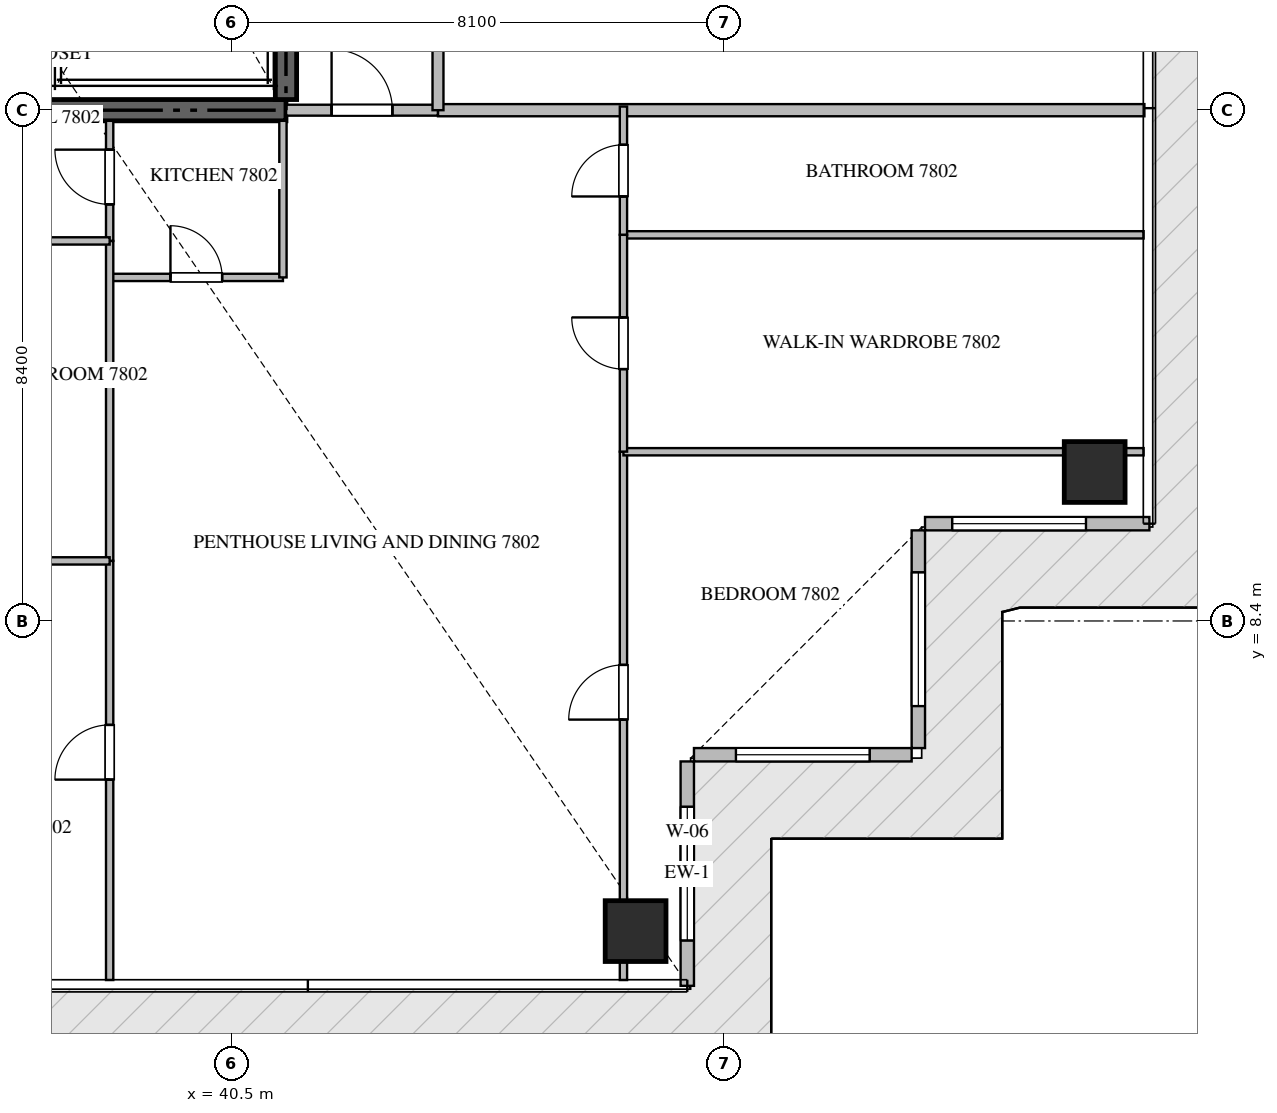
"""IFC4 building model, lengths in metres.
Left out: names, types, materials, properties, quantities, classifications, styles, units other than length and angle.
Written with IfcOpenShell. Run it as: python <this file> out.ifc"""

import sys

from ifc_helpers import new_model, si_unit, direction, frame, frame_2d, origin, origin_2d, place, context, subcontext, project, spatial, rectangle, extrude, source, transform, mapped, element, fill, save


model = new_model("IFC4")
c1 = context("Model", 3, precision=1e-05, world=origin(), true_north=direction((0.0, 1.0)))
c2 = subcontext(c1, "Body", "Model", "MODEL_VIEW")
j1 = project(units=[si_unit("LENGTHUNIT", "METRE"), si_unit("PLANEANGLEUNIT", "RADIAN")], contexts=[c1])
p1 = place(None, origin())
s1 = spatial("IfcSite", under=j1, at=p1, CompositionType="ELEMENT")
p2 = place(p1, origin())
s2 = spatial("IfcBuilding", under=s1, at=p2, CompositionType="ELEMENT")
p3 = place(p2, frame((0.0, 0.0, 313.7)))
s3 = spatial("IfcBuildingStorey", under=s2, at=p3, CompositionType="ELEMENT", Elevation=313.7)
p4 = place(p3, frame((23.4, 16.8, -0.26), z_axis=(0.0, 0.0, 1.0), x_axis=(1.0, 0.0, 0.0)))
e1 = element("IfcWall", 1, at=p4, inside=s3, PredefinedType="SHEAR", context=c2, shape_type="SweptSolid", body=[
    extrude(rectangle(XDim=18.0, YDim=0.35, at=frame_2d((9.0, 0.0))), origin(), (0.0, 0.0, 1.0), 4.048),
])
p5 = place(p3, frame((41.4, 16.975, -0.26), z_axis=(0.0, 0.0, 1.0), x_axis=(0.0, 1.0, 0.0)))
e2 = element("IfcWall", 2, at=p5, inside=s3, PredefinedType="SHEAR", context=c2, shape_type="SweptSolid", body=[
    extrude(rectangle(XDim=8.375, YDim=0.35, at=frame_2d((4.188, 0.0))), origin(), (0.0, 0.0, 1.0), 4.048),
])
m1 = source(origin(), c2, "Body", "SweptSolid", [
    extrude(rectangle(XDim=1.0, YDim=1.0, at=origin_2d()), origin(), (0.0, 0.0, 1.0), 4.05),
])
for number, where, z_axis, x_axis in (
    (3, (47.15, 3.3, -0.26), (0.0, 0.0, 1.0), (1.0, 0.0, 0.0)),
    (4, (54.7, 10.85, -0.26), (0.0, 0.0, 1.0), (1.0, 0.0, 0.0)),
):
    element("IfcColumn", number, at=place(p3, frame(where, z_axis=z_axis, x_axis=x_axis)), inside=s3, PredefinedType="COLUMN", context=c2, shape_type="MappedRepresentation", body=[
        mapped(m1, transform((0.0, 0.0, 0.0), scale=1.0)),
    ])
p6 = place(p3, frame((48.0, 2.4, 0.0), z_axis=(0.0, 0.0, 1.0), x_axis=(0.0, 1.0, 0.0)))
e5 = element("IfcWall", 5, at=p6, inside=s3, PredefinedType="ELEMENTEDWALL", context=c2, shape_type="SweptSolid", body=[
    extrude(rectangle(XDim=3.69, YDim=0.22, at=frame_2d((1.845, 0.0))), origin(), (0.0, 0.0, 1.0), 3.775),
])
p7 = place(p6, frame((0.745, 0.0, 0.65)))
e6 = element("IfcOpeningElement", 6, at=p7, cuts=e5, PredefinedType="OPENING", context=c2, shape_type="SweptSolid", body=[
    extrude(rectangle(XDim=2.2, YDim=2.4, at=frame_2d((1.1, 1.2))), frame((0.0, 0.12, 0.0), z_axis=(0.0, -1.0, 0.0), x_axis=(1.0, 0.0, 0.0)), (0.0, 0.0, 1.0), 0.24),
])
p8 = place(p3, frame((48.11, 6.2, 0.0), z_axis=(0.0, 0.0, 1.0), x_axis=(1.0, 0.0, 0.0)))
e7 = element("IfcWall", 7, at=p8, inside=s3, PredefinedType="ELEMENTEDWALL", context=c2, shape_type="SweptSolid", body=[
    extrude(rectangle(XDim=3.58, YDim=0.22, at=frame_2d((1.79, 0.0))), origin(), (0.0, 0.0, 1.0), 3.775),
])
p9 = place(p8, frame((0.69, 0.0, 0.65)))
e8 = element("IfcOpeningElement", 8, at=p9, cuts=e7, PredefinedType="OPENING", context=c2, shape_type="SweptSolid", body=[
    extrude(rectangle(XDim=2.2, YDim=2.4, at=frame_2d((1.1, 1.2))), frame((0.0, 0.12, 0.0), z_axis=(0.0, -1.0, 0.0), x_axis=(1.0, 0.0, 0.0)), (0.0, 0.0, 1.0), 0.24),
])
p10 = place(p3, frame((51.8, 6.31, 0.0), z_axis=(0.0, 0.0, 1.0), x_axis=(0.0, 1.0, 0.0)))
e9 = element("IfcWall", 9, at=p10, inside=s3, PredefinedType="ELEMENTEDWALL", context=c2, shape_type="SweptSolid", body=[
    extrude(rectangle(XDim=3.58, YDim=0.22, at=frame_2d((1.79, 0.0))), origin(), (0.0, 0.0, 1.0), 3.775),
])
p11 = place(p10, frame((0.69, 0.0, 0.65)))
e10 = element("IfcOpeningElement", 10, at=p11, cuts=e9, PredefinedType="OPENING", context=c2, shape_type="SweptSolid", body=[
    extrude(rectangle(XDim=2.2, YDim=2.4, at=frame_2d((1.1, 1.2))), frame((0.0, 0.12, 0.0), z_axis=(0.0, -1.0, 0.0), x_axis=(1.0, 0.0, 0.0)), (0.0, 0.0, 1.0), 0.24),
])
p12 = place(p3, frame((51.91, 10.0, 0.0), z_axis=(0.0, 0.0, 1.0), x_axis=(1.0, 0.0, 0.0)))
e11 = element("IfcWall", 11, at=p12, inside=s3, PredefinedType="ELEMENTEDWALL", context=c2, shape_type="SweptSolid", body=[
    extrude(rectangle(XDim=3.69, YDim=0.22, at=frame_2d((1.845, 0.0))), origin(), (0.0, 0.0, 1.0), 3.775),
])
p13 = place(p12, frame((0.447, 0.0, 0.65)))
e12 = element("IfcOpeningElement", 12, at=p13, cuts=e11, PredefinedType="OPENING", context=c2, shape_type="SweptSolid", body=[
    extrude(rectangle(XDim=2.2, YDim=2.4, at=frame_2d((1.1, 1.2))), frame((0.0, 0.12, 0.0), z_axis=(0.0, -1.0, 0.0), x_axis=(1.0, 0.0, 0.0)), (0.0, 0.0, 1.0), 0.24),
])
p14 = place(p3, frame((43.9, 16.8, 0.0), z_axis=(0.0, 0.0, 1.0), x_axis=(1.0, 0.0, 0.0)))
e13 = element("IfcWall", 13, at=p14, inside=s3, PredefinedType="PARTITIONING", context=c2, shape_type="SweptSolid", body=[
    extrude(rectangle(XDim=11.618, YDim=0.2, at=frame_2d((5.809, 0.0))), origin(), (0.0, 0.0, 1.0), 3.79),
])
p15 = place(p3, frame((41.402, 16.8, 0.0), z_axis=(0.0, 0.0, 1.0), x_axis=(1.0, 0.0, 0.0)))
e14 = element("IfcWall", 14, at=p15, inside=s3, PredefinedType="PARTITIONING", context=c2, shape_type="SweptSolid", body=[
    extrude(rectangle(XDim=2.496, YDim=0.18, at=frame_2d((1.248, 0.0))), origin(), (0.0, 0.0, 1.0), 3.79),
])
p16 = place(p15, frame((0.748, 0.0, 0.0)))
e15 = element("IfcOpeningElement", 15, at=p16, cuts=e14, PredefinedType="OPENING", context=c2, shape_type="SweptSolid", body=[
    extrude(rectangle(XDim=1.0, YDim=2.15, at=frame_2d((0.5, 1.075))), frame((0.0, 0.1, 0.0), z_axis=(0.0, -1.0, 0.0), x_axis=(1.0, 0.0, 0.0)), (0.0, 0.0, 1.0), 0.2),
])
p17 = place(p3, frame((43.9, 16.8, 0.0), z_axis=(0.0, 0.0, 1.0), x_axis=(0.0, 1.0, 0.0)))
e16 = element("IfcWall", 16, at=p17, inside=s3, PredefinedType="PARTITIONING", context=c2, shape_type="SweptSolid", body=[
    extrude(rectangle(XDim=16.8, YDim=0.18, at=frame_2d((8.4, 0.0))), origin(), (0.0, 0.0, 1.0), 3.79),
])
p18 = place(p17, frame((2.67, 0.0, 0.0)))
e17 = element("IfcOpeningElement", 17, at=p18, cuts=e16, PredefinedType="OPENING", context=c2, shape_type="SweptSolid", body=[
    extrude(rectangle(XDim=1.0, YDim=2.15, at=frame_2d((0.5, 1.075))), frame((0.0, 0.1, 0.0), z_axis=(0.0, -1.0, 0.0), x_axis=(1.0, 0.0, 0.0)), (0.0, 0.0, 1.0), 0.2),
])
p19 = place(p17, frame((11.107, 0.0, 0.0)))
e18 = element("IfcOpeningElement", 18, at=p19, cuts=e16, PredefinedType="OPENING", context=c2, shape_type="SweptSolid", body=[
    extrude(rectangle(XDim=1.0, YDim=2.15, at=frame_2d((0.5, 1.075))), frame((0.0, 0.1, 0.0), z_axis=(0.0, -1.0, 0.0), x_axis=(1.0, 0.0, 0.0)), (0.0, 0.0, 1.0), 0.2),
])
p20 = place(p3, frame((38.5, 14.05, 0.0), z_axis=(0.0, 0.0, 1.0), x_axis=(1.0, 0.0, 0.0)))
e19 = element("IfcWall", 19, at=p20, inside=s3, PredefinedType="PARTITIONING", context=c2, shape_type="SweptSolid", body=[
    extrude(rectangle(XDim=2.85, YDim=0.12, at=frame_2d((1.425, 0.0))), origin(), (0.0, 0.0, 1.0), 3.79),
])
p21 = place(p20, frame((1.0, 0.0, 0.0)))
e20 = element("IfcOpeningElement", 20, at=p21, cuts=e19, PredefinedType="OPENING", context=c2, shape_type="SweptSolid", body=[
    extrude(rectangle(XDim=0.85, YDim=2.1, at=frame_2d((0.425, 1.05))), frame((0.0, 0.07, 0.0), z_axis=(0.0, -1.0, 0.0), x_axis=(1.0, 0.0, 0.0)), (0.0, 0.0, 1.0), 0.14),
])
p22 = place(p3, frame((41.35, 14.05, 0.0), z_axis=(0.0, 0.0, 1.0), x_axis=(0.0, 1.0, 0.0)))
e21 = element("IfcWall", 21, at=p22, inside=s3, PredefinedType="PARTITIONING", context=c2, shape_type="SweptSolid", body=[
    extrude(rectangle(XDim=2.575, YDim=0.12, at=frame_2d((1.288, 0.0))), origin(), (0.0, 0.0, 1.0), 3.79),
])
p23 = place(p3, frame((38.5, 14.65, 0.0), z_axis=(0.0, 0.0, 1.0), x_axis=(0.0, 1.0, 0.0)))
e22 = element("IfcWall", 22, at=p23, inside=s3, PredefinedType="PARTITIONING", context=c2, shape_type="SweptSolid", body=[
    extrude(rectangle(XDim=1.975, YDim=0.12, at=frame_2d((0.988, 0.0))), origin(), (0.0, 0.0, 1.0), 3.79),
])
p24 = place(p23, frame((0.601, 0.0, 0.0)))
e23 = element("IfcOpeningElement", 23, at=p24, cuts=e22, PredefinedType="OPENING", context=c2, shape_type="SweptSolid", body=[
    extrude(rectangle(XDim=0.9, YDim=2.1, at=frame_2d((0.45, 1.05))), frame((0.0, 0.07, 0.0), z_axis=(0.0, -1.0, 0.0), x_axis=(1.0, 0.0, 0.0)), (0.0, 0.0, 1.0), 0.14),
])
p25 = place(p3, frame((38.5, 2.495, 0.0), z_axis=(0.0, 0.0, 1.0), x_axis=(0.0, 1.0, 0.0)))
e24 = element("IfcWall", 24, at=p25, inside=s3, PredefinedType="PARTITIONING", context=c2, shape_type="SweptSolid", body=[
    extrude(rectangle(XDim=6.893, YDim=0.12, at=frame_2d((3.446, 0.0))), origin(), (0.0, 0.0, 1.0), 3.79),
])
p26 = place(p25, frame((3.296, 0.0, 0.0)))
e25 = element("IfcOpeningElement", 25, at=p26, cuts=e24, PredefinedType="OPENING", context=c2, shape_type="SweptSolid", body=[
    extrude(rectangle(XDim=0.9, YDim=2.1, at=frame_2d((0.45, 1.05))), frame((0.0, 0.07, 0.0), z_axis=(0.0, -1.0, 0.0), x_axis=(1.0, 0.0, 0.0)), (0.0, 0.0, 1.0), 0.14),
])
p27 = place(p3, frame((38.5, 9.39, 0.0), z_axis=(0.0, 0.0, 1.0), x_axis=(0.0, 1.0, 0.0)))
e26 = element("IfcWall", 26, at=p27, inside=s3, PredefinedType="PARTITIONING", context=c2, shape_type="SweptSolid", body=[
    extrude(rectangle(XDim=5.258, YDim=0.12, at=frame_2d((2.629, 0.0))), origin(), (0.0, 0.0, 1.0), 3.79),
])
p28 = place(p3, frame((33.38, 9.388, 0.0), z_axis=(0.0, 0.0, 1.0), x_axis=(1.0, 0.0, 0.0)))
e27 = element("IfcWall", 27, at=p28, inside=s3, PredefinedType="PARTITIONING", context=c2, shape_type="SweptSolid", body=[
    extrude(rectangle(XDim=5.12, YDim=0.12, at=frame_2d((2.56, 0.0))), origin(), (0.0, 0.0, 1.0), 3.79),
])
p29 = place(p3, frame((35.482, 14.65, 0.0), z_axis=(0.0, 0.0, 1.0), x_axis=(1.0, 0.0, 0.0)))
e28 = element("IfcWall", 28, at=p29, inside=s3, PredefinedType="PARTITIONING", context=c2, shape_type="SweptSolid", body=[
    extrude(rectangle(XDim=3.018, YDim=0.12, at=frame_2d((1.509, 0.0))), origin(), (0.0, 0.0, 1.0), 3.79),
])
p30 = place(p29, frame((1.084, 0.0, 0.0)))
e29 = element("IfcOpeningElement", 29, at=p30, cuts=e28, PredefinedType="OPENING", context=c2, shape_type="SweptSolid", body=[
    extrude(rectangle(XDim=0.85, YDim=2.1, at=frame_2d((0.425, 1.05))), frame((0.0, 0.07, 0.0), z_axis=(0.0, -1.0, 0.0), x_axis=(1.0, 0.0, 0.0)), (0.0, 0.0, 1.0), 0.14),
])
p31 = place(p3, frame((46.95, 2.495, 0.0), z_axis=(0.0, 0.0, 1.0), x_axis=(0.0, 1.0, 0.0)))
e30 = element("IfcWall", 30, at=p31, inside=s3, PredefinedType="PARTITIONING", context=c2, shape_type="SweptSolid", body=[
    extrude(rectangle(XDim=8.688, YDim=0.12, at=frame_2d((4.344, 0.0))), origin(), (0.0, 0.0, 1.0), 3.292),
])
p32 = place(p31, frame((4.283, 0.0, 0.0)))
e31 = element("IfcOpeningElement", 31, at=p32, cuts=e30, PredefinedType="OPENING", context=c2, shape_type="SweptSolid", body=[
    extrude(rectangle(XDim=0.9, YDim=2.1, at=frame_2d((0.45, 1.05))), frame((0.0, 0.07, 0.0), z_axis=(0.0, -1.0, 0.0), x_axis=(1.0, 0.0, 0.0)), (0.0, 0.0, 1.0), 0.14),
])
for number, where, z_axis, x_axis in (
    (32, (46.95, 11.183, 0.0), (0.0, 0.0, 1.0), (1.0, 0.0, 0.0)),
    (33, (46.95, 14.75, 0.0), (0.0, 0.0, 1.0), (1.0, 0.0, 0.0)),
):
    element("IfcWall", number, at=place(p3, frame(where, z_axis=z_axis, x_axis=x_axis)), inside=s3, PredefinedType="PARTITIONING", context=c2, shape_type="SweptSolid", body=[
        extrude(rectangle(XDim=8.555, YDim=0.12, at=frame_2d((4.277, 0.0))), origin(), (0.0, 0.0, 1.0), 3.79),
    ])
p33 = place(p3, frame((46.95, 11.185, 0.0), z_axis=(0.0, 0.0, 1.0), x_axis=(0.0, 1.0, 0.0)))
e34 = element("IfcWall", 34, at=p33, inside=s3, PredefinedType="PARTITIONING", context=c2, shape_type="SweptSolid", body=[
    extrude(rectangle(XDim=3.565, YDim=0.12, at=frame_2d((1.782, 0.0))), origin(), (0.0, 0.0, 1.0), 3.372),
])
p34 = place(p33, frame((1.357, 0.0, 0.0)))
e35 = element("IfcOpeningElement", 35, at=p34, cuts=e34, PredefinedType="OPENING", context=c2, shape_type="SweptSolid", body=[
    extrude(rectangle(XDim=0.85, YDim=2.1, at=frame_2d((0.425, 1.05))), frame((0.0, 0.07, 0.0), z_axis=(0.0, -1.0, 0.0), x_axis=(1.0, 0.0, 0.0)), (0.0, 0.0, 1.0), 0.14),
])
p35 = place(p3, frame((46.95, 14.752, 0.0), z_axis=(0.0, 0.0, 1.0), x_axis=(0.0, 1.0, 0.0)))
e36 = element("IfcWall", 36, at=p35, inside=s3, PredefinedType="PARTITIONING", context=c2, shape_type="SweptSolid", body=[
    extrude(rectangle(XDim=2.108, YDim=0.12, at=frame_2d((1.054, 0.0))), origin(), (0.0, 0.0, 1.0), 3.372),
])
p36 = place(p35, frame((0.629, 0.0, 0.0)))
e37 = element("IfcOpeningElement", 37, at=p36, cuts=e36, PredefinedType="OPENING", context=c2, shape_type="SweptSolid", body=[
    extrude(rectangle(XDim=0.85, YDim=2.1, at=frame_2d((0.425, 1.05))), frame((0.0, 0.07, 0.0), z_axis=(0.0, -1.0, 0.0), x_axis=(1.0, 0.0, 0.0)), (0.0, 0.0, 1.0), 0.14),
])
m2 = source(origin(), c2, "Body", "SweptSolid", [
    extrude(rectangle(XDim=2.2, YDim=2.4, at=frame_2d((1.1, 1.2))), frame((0.0, 0.03, 0.0), z_axis=(0.0, -1.0, 0.0), x_axis=(1.0, 0.0, 0.0)), (0.0, 0.0, 1.0), 0.06),
])
p37 = place(p7, origin())
e38 = element("IfcWindow", 38, at=p37, inside=s3, PartitioningType="SINGLE_PANEL", PredefinedType="WINDOW", context=c2, shape_type="MappedRepresentation", body=[
    mapped(m2, transform((0.0, 0.0, 0.0), scale=1.0)),
])
fill(e6, e38)
p38 = place(p9, origin())
e39 = element("IfcWindow", 39, at=p38, inside=s3, PartitioningType="SINGLE_PANEL", PredefinedType="WINDOW", context=c2, shape_type="MappedRepresentation", body=[
    mapped(m2, transform((0.0, 0.0, 0.0), scale=1.0)),
])
fill(e8, e39)
p39 = place(p11, origin())
e40 = element("IfcWindow", 40, at=p39, inside=s3, PartitioningType="SINGLE_PANEL", PredefinedType="WINDOW", context=c2, shape_type="MappedRepresentation", body=[
    mapped(m2, transform((0.0, 0.0, 0.0), scale=1.0)),
])
fill(e10, e40)
p40 = place(p13, origin())
e41 = element("IfcWindow", 41, at=p40, inside=s3, PartitioningType="SINGLE_PANEL", PredefinedType="WINDOW", context=c2, shape_type="MappedRepresentation", body=[
    mapped(m2, transform((0.0, 0.0, 0.0), scale=1.0)),
])
fill(e12, e41)
m3 = source(origin(), c2, "Body", "SweptSolid", [
    extrude(rectangle(XDim=1.0, YDim=2.15, at=frame_2d((0.5, 1.075))), frame((0.0, 0.025, 0.0), z_axis=(0.0, -1.0, 0.0), x_axis=(1.0, 0.0, 0.0)), (0.0, 0.0, 1.0), 0.05),
])
p41 = place(p16, origin())
e42 = element("IfcDoor", 42, at=p41, inside=s3, OperationType="SINGLE_SWING_LEFT", PredefinedType="DOOR", context=c2, shape_type="MappedRepresentation", body=[
    mapped(m3, transform((0.0, 0.0, 0.0), scale=1.0)),
])
fill(e15, e42)
m4 = source(origin(), c2, "Body", "SweptSolid", [
    extrude(rectangle(XDim=0.85, YDim=2.1, at=frame_2d((0.425, 1.05))), frame((0.0, 0.025, 0.0), z_axis=(0.0, -1.0, 0.0), x_axis=(1.0, 0.0, 0.0)), (0.0, 0.0, 1.0), 0.05),
])
p42 = place(p21, origin())
e43 = element("IfcDoor", 43, at=p42, inside=s3, OperationType="SINGLE_SWING_LEFT", PredefinedType="DOOR", context=c2, shape_type="MappedRepresentation", body=[
    mapped(m4, transform((0.0, 0.0, 0.0), scale=1.0)),
])
fill(e20, e43)
m5 = source(origin(), c2, "Body", "SweptSolid", [
    extrude(rectangle(XDim=0.9, YDim=2.1, at=frame_2d((0.45, 1.05))), frame((0.0, 0.025, 0.0), z_axis=(0.0, -1.0, 0.0), x_axis=(1.0, 0.0, 0.0)), (0.0, 0.0, 1.0), 0.05),
])
p43 = place(p24, origin())
e44 = element("IfcDoor", 44, at=p43, inside=s3, OperationType="SINGLE_SWING_RIGHT", PredefinedType="DOOR", context=c2, shape_type="MappedRepresentation", body=[
    mapped(m5, transform((0.0, 0.0, 0.0), scale=1.0)),
])
fill(e23, e44)
p44 = place(p26, origin())
e45 = element("IfcDoor", 45, at=p44, inside=s3, OperationType="SINGLE_SWING_LEFT", PredefinedType="DOOR", context=c2, shape_type="MappedRepresentation", body=[
    mapped(m5, transform((0.0, 0.0, 0.0), scale=1.0)),
])
fill(e25, e45)
p45 = place(p32, origin())
e46 = element("IfcDoor", 46, at=p45, inside=s3, OperationType="SINGLE_SWING_LEFT", PredefinedType="DOOR", context=c2, shape_type="MappedRepresentation", body=[
    mapped(m5, transform((0.0, 0.0, 0.0), scale=1.0)),
])
fill(e31, e46)
p46 = place(p34, origin())
e47 = element("IfcDoor", 47, at=p46, inside=s3, OperationType="SINGLE_SWING_RIGHT", PredefinedType="DOOR", context=c2, shape_type="MappedRepresentation", body=[
    mapped(m4, transform((0.0, 0.0, 0.0), scale=1.0)),
])
fill(e35, e47)
p47 = place(p36, origin())
e48 = element("IfcDoor", 48, at=p47, inside=s3, OperationType="SINGLE_SWING_LEFT", PredefinedType="DOOR", context=c2, shape_type="MappedRepresentation", body=[
    mapped(m4, transform((0.0, 0.0, 0.0), scale=1.0)),
])
fill(e37, e48)
save(model, sys.argv[1])
